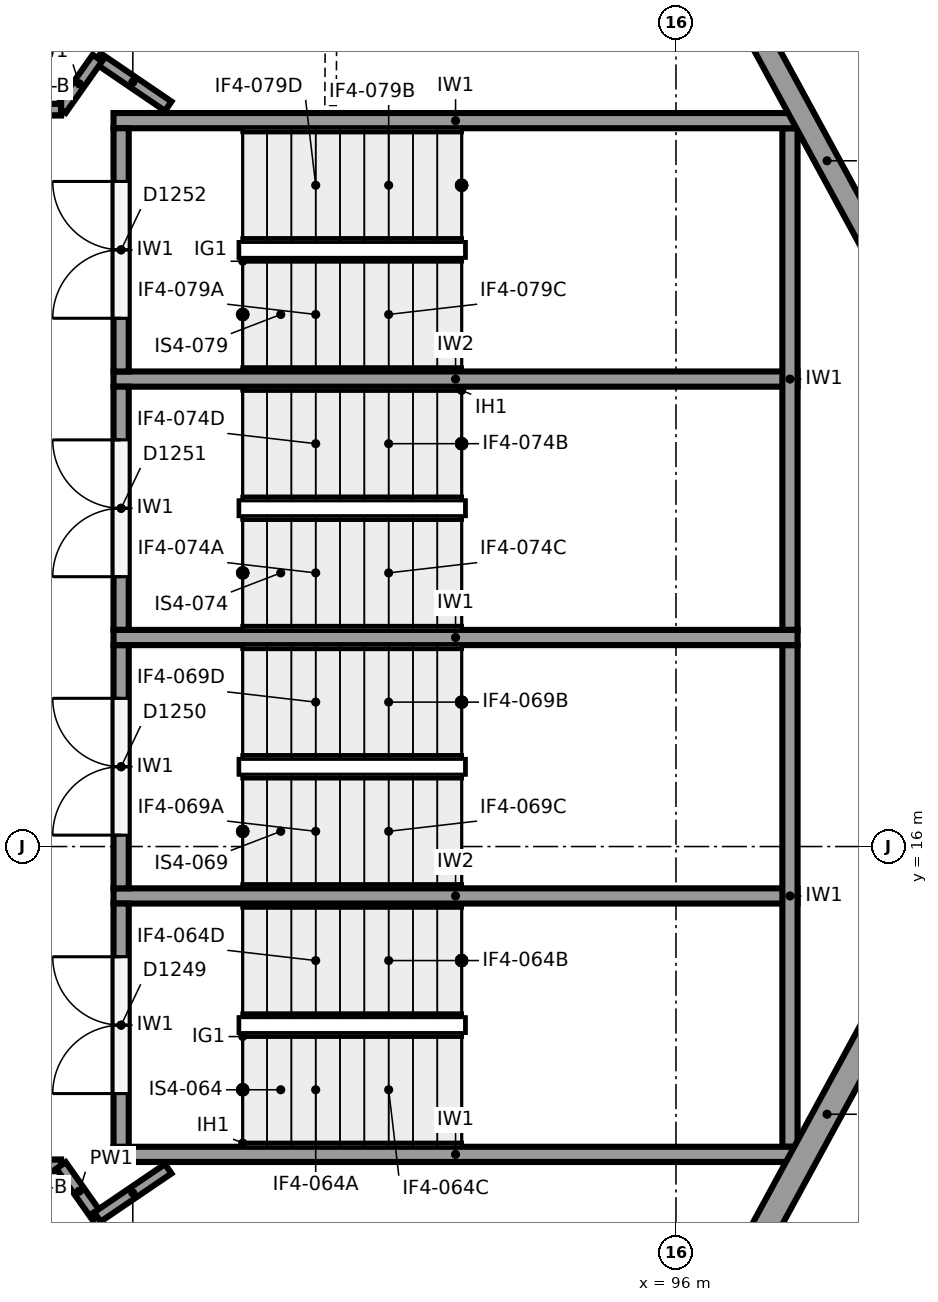
"""IFC4 building model, lengths in metres.
Left out: names, types, materials, properties, quantities, classifications, styles, units other than length and angle.
Written with IfcOpenShell. Run it as: python <this file> out.ifc"""

import sys

from ifc_helpers import new_model, si_unit, direction, frame, frame_2d, origin, place, context, subcontext, project, spatial, rectangle, extrude, element, fill, save


model = new_model("IFC4")
c1 = context("Model", 3, precision=1e-05, world=origin(), true_north=direction((0.0, 1.0)))
c2 = subcontext(c1, "Body", "Model", "MODEL_VIEW")
j1 = project(units=[si_unit("LENGTHUNIT", "METRE"), si_unit("PLANEANGLEUNIT", "RADIAN")], contexts=[c1])
p1 = place(None, origin())
s1 = spatial("IfcSite", under=j1, at=p1, CompositionType="ELEMENT")
p2 = place(p1, origin())
s2 = spatial("IfcBuilding", under=s1, at=p2, CompositionType="ELEMENT")
p3 = place(p2, frame((0.0, 0.0, 12.0)))
s3 = spatial("IfcBuildingStorey", under=s2, at=p3, CompositionType="ELEMENT", Elevation=12.0)
p4 = place(p3, frame((101.161, 18.311, 0.0), z_axis=(0.0, 0.0, 1.0), x_axis=(-0.477867771117, -0.878431780691, 0.0)))
e1 = element("IfcWall", 1, at=p4, inside=s3, PredefinedType="SOLIDWALL", context=c2, shape_type="SweptSolid", body=[
    extrude(rectangle(XDim=13.28, YDim=0.35, at=frame_2d((6.64, 0.0))), origin(), (0.0, 0.0, 1.0), 4.35),
])
p5 = place(p4, frame((11.63, 0.0, 1.0)))
e2 = element("IfcOpeningElement", 2, at=p5, cuts=e1, PredefinedType="OPENING", context=c2, shape_type="SweptSolid", body=[
    extrude(rectangle(XDim=0.9, YDim=3.25, at=frame_2d((0.45, 1.625))), frame((0.0, 0.185, 0.0), z_axis=(0.0, -1.0, 0.0), x_axis=(1.0, 0.0, 0.0)), (0.0, 0.0, 1.0), 0.37),
])
p6 = place(p4, frame((9.53, 0.0, 1.0)))
e3 = element("IfcOpeningElement", 3, at=p6, cuts=e1, PredefinedType="OPENING", context=c2, shape_type="SweptSolid", body=[
    extrude(rectangle(XDim=0.9, YDim=3.25, at=frame_2d((0.45, 1.625))), frame((0.0, 0.185, 0.0), z_axis=(0.0, -1.0, 0.0), x_axis=(1.0, 0.0, 0.0)), (0.0, 0.0, 1.0), 0.37),
])
p7 = place(p4, frame((1.13, 0.0, 1.0)))
e4 = element("IfcOpeningElement", 4, at=p7, cuts=e1, PredefinedType="OPENING", context=c2, shape_type="SweptSolid", body=[
    extrude(rectangle(XDim=0.9, YDim=3.25, at=frame_2d((0.45, 1.625))), frame((0.0, 0.185, 0.0), z_axis=(0.0, -1.0, 0.0), x_axis=(1.0, 0.0, 0.0)), (0.0, 0.0, 1.0), 0.37),
])
p8 = place(p3, frame((94.815, 30.855, 0.0), z_axis=(0.0, 0.0, 1.0), x_axis=(0.477867771117, -0.878431780691, 0.0)))
e5 = element("IfcWall", 5, at=p8, inside=s3, PredefinedType="SOLIDWALL", context=c2, shape_type="SweptSolid", body=[
    extrude(rectangle(XDim=13.28, YDim=0.3, at=frame_2d((6.64, 0.0))), origin(), (0.0, 0.0, 1.0), 4.35),
])
for number, where, z_axis, x_axis in (
    (6, (97.6, 11.95, 0.0), (0.0, 0.0, 1.0), (-1.0, 0.0, 0.0)),
    (7, (97.6, 18.75, 0.0), (0.0, 0.0, 1.0), (-1.0, 0.0, 0.0)),
    (8, (97.6, 25.55, 0.0), (0.0, 0.0, 1.0), (-1.0, 0.0, 0.0)),
):
    element("IfcWall", number, at=place(p3, frame(where, z_axis=z_axis, x_axis=x_axis)), inside=s3, PredefinedType="SHEAR", context=c2, shape_type="SweptSolid", body=[
        extrude(rectangle(XDim=9.0, YDim=0.2, at=frame_2d((4.5, 0.0))), origin(), (0.0, 0.0, 1.0), 5.65),
    ])
for number, where, z_axis, x_axis in (
    (9, (97.5, 12.05, 0.0), (0.0, 0.0, 1.0), (0.0, 1.0, 0.0)),
    (10, (97.5, 18.85, 0.0), (0.0, 0.0, 1.0), (0.0, 1.0, 0.0)),
):
    element("IfcWall", number, at=place(p3, frame(where, z_axis=z_axis, x_axis=x_axis)), inside=s3, PredefinedType="SHEAR", context=c2, shape_type="SweptSolid", body=[
        extrude(rectangle(XDim=6.6, YDim=0.2, at=frame_2d((3.3, 0.0))), origin(), (0.0, 0.0, 1.0), 5.65),
    ])
for number, where, z_axis, x_axis in (
    (11, (97.6, 15.35, 0.0), (0.0, 0.0, 1.0), (-1.0, 0.0, 0.0)),
    (12, (97.6, 22.15, 0.0), (0.0, 0.0, 1.0), (-1.0, 0.0, 0.0)),
):
    element("IfcWall", number, at=place(p3, frame(where, z_axis=z_axis, x_axis=x_axis)), inside=s3, PredefinedType="SHEAR", context=c2, shape_type="SweptSolid", body=[
        extrude(rectangle(XDim=9.0, YDim=0.2, at=frame_2d((4.5, 0.0))), origin(), (0.0, 0.0, 1.0), 5.65),
    ])
p9 = place(p3, frame((88.7, 12.05, 0.0), z_axis=(0.0, 0.0, 1.0), x_axis=(0.0, 1.0, 0.0)))
e13 = element("IfcWall", 13, at=p9, inside=s3, PredefinedType="SHEAR", context=c2, shape_type="SweptSolid", body=[
    extrude(rectangle(XDim=3.2, YDim=0.2, at=frame_2d((1.6, 0.0))), origin(), (0.0, 0.0, 1.0), 5.65),
])
p10 = place(p9, frame((0.7, 0.0, 0.0)))
e14 = element("IfcOpeningElement", 14, at=p10, cuts=e13, PredefinedType="OPENING", context=c2, shape_type="SweptSolid", body=[
    extrude(rectangle(XDim=1.8, YDim=2.1, at=frame_2d((0.9, 1.05))), frame((0.0, 0.11, 0.0), z_axis=(0.0, -1.0, 0.0), x_axis=(1.0, 0.0, 0.0)), (0.0, 0.0, 1.0), 0.22),
])
p11 = place(p3, frame((88.7, 15.45, 0.0), z_axis=(0.0, 0.0, 1.0), x_axis=(0.0, 1.0, 0.0)))
e15 = element("IfcWall", 15, at=p11, inside=s3, PredefinedType="SHEAR", context=c2, shape_type="SweptSolid", body=[
    extrude(rectangle(XDim=3.2, YDim=0.2, at=frame_2d((1.6, 0.0))), origin(), (0.0, 0.0, 1.0), 5.65),
])
p12 = place(p11, frame((0.7, 0.0, 0.0)))
e16 = element("IfcOpeningElement", 16, at=p12, cuts=e15, PredefinedType="OPENING", context=c2, shape_type="SweptSolid", body=[
    extrude(rectangle(XDim=1.8, YDim=2.1, at=frame_2d((0.9, 1.05))), frame((0.0, 0.11, 0.0), z_axis=(0.0, -1.0, 0.0), x_axis=(1.0, 0.0, 0.0)), (0.0, 0.0, 1.0), 0.22),
])
p13 = place(p3, frame((88.7, 18.85, 0.0), z_axis=(0.0, 0.0, 1.0), x_axis=(0.0, 1.0, 0.0)))
e17 = element("IfcWall", 17, at=p13, inside=s3, PredefinedType="SHEAR", context=c2, shape_type="SweptSolid", body=[
    extrude(rectangle(XDim=3.2, YDim=0.2, at=frame_2d((1.6, 0.0))), origin(), (0.0, 0.0, 1.0), 5.65),
])
p14 = place(p13, frame((0.7, 0.0, 0.0)))
e18 = element("IfcOpeningElement", 18, at=p14, cuts=e17, PredefinedType="OPENING", context=c2, shape_type="SweptSolid", body=[
    extrude(rectangle(XDim=1.8, YDim=2.1, at=frame_2d((0.9, 1.05))), frame((0.0, 0.11, 0.0), z_axis=(0.0, -1.0, 0.0), x_axis=(1.0, 0.0, 0.0)), (0.0, 0.0, 1.0), 0.22),
])
p15 = place(p3, frame((88.7, 22.25, 0.0), z_axis=(0.0, 0.0, 1.0), x_axis=(0.0, 1.0, 0.0)))
e19 = element("IfcWall", 19, at=p15, inside=s3, PredefinedType="SHEAR", context=c2, shape_type="SweptSolid", body=[
    extrude(rectangle(XDim=3.2, YDim=0.2, at=frame_2d((1.6, 0.0))), origin(), (0.0, 0.0, 1.0), 5.65),
])
p16 = place(p15, frame((0.7, 0.0, 0.0)))
e20 = element("IfcOpeningElement", 20, at=p16, cuts=e19, PredefinedType="OPENING", context=c2, shape_type="SweptSolid", body=[
    extrude(rectangle(XDim=1.8, YDim=2.1, at=frame_2d((0.9, 1.05))), frame((0.0, 0.11, 0.0), z_axis=(0.0, -1.0, 0.0), x_axis=(1.0, 0.0, 0.0)), (0.0, 0.0, 1.0), 0.22),
])
p17 = place(p3, frame((91.455, 25.75, 0.0), z_axis=(0.0, 0.0, 1.0), x_axis=(0.006125459352, 0.999981239198, 0.0)))
e21 = element("IfcWall", 21, at=p17, inside=s3, PredefinedType="PARTITIONING", context=c2, shape_type="SweptSolid", body=[
    extrude(rectangle(XDim=4.783, YDim=0.15, at=frame_2d((2.391, 0.0))), origin(), (0.0, 0.0, 1.0), 5.65),
])
p18 = place(p17, frame((1.95, 0.0, 0.0)))
e22 = element("IfcOpeningElement", 22, at=p18, cuts=e21, PredefinedType="OPENING", context=c2, shape_type="SweptSolid", body=[
    extrude(rectangle(XDim=1.0, YDim=2.1, at=frame_2d((0.5, 1.05))), frame((0.0, 0.085, 0.0), z_axis=(0.0, -1.0, 0.0), x_axis=(1.0, 0.0, 0.0)), (0.0, 0.0, 1.0), 0.17),
])
p19 = place(p3, frame((89.32, 25.74, 0.0), z_axis=(0.0, 0.0, 1.0), x_axis=(-0.826749248939, 0.562570599462, 0.0)))
e23 = element("IfcWall", 23, at=p19, inside=s3, PredefinedType="PARTITIONING", context=c2, shape_type="SweptSolid", body=[
    extrude(rectangle(XDim=1.127, YDim=0.15, at=frame_2d((0.564, 0.0))), origin(), (0.0, 0.0, 1.0), 5.65),
])
p20 = place(p3, frame((88.388, 26.374, 0.0), z_axis=(0.0, 0.0, 1.0), x_axis=(-0.5761634622, -0.817334487726, 0.0)))
e24 = element("IfcWall", 24, at=p20, inside=s3, PredefinedType="PARTITIONING", context=c2, shape_type="SweptSolid", body=[
    extrude(rectangle(XDim=0.83, YDim=0.15, at=frame_2d((0.415, 0.0))), origin(), (0.0, 0.0, 1.0), 5.65),
])
p21 = place(p3, frame((87.909, 25.695, 0.0), z_axis=(0.0, 0.0, 1.0), x_axis=(-0.999999997827, -6.5919578e-05, 0.0)))
e25 = element("IfcWall", 25, at=p21, inside=s3, PredefinedType="PARTITIONING", context=c2, shape_type="SweptSolid", body=[
    extrude(rectangle(XDim=3.704, YDim=0.15, at=frame_2d((1.852, 0.0))), origin(), (0.0, 0.0, 1.0), 4.55),
])
p22 = place(p21, frame((0.65, 0.0, 0.0)))
e26 = element("IfcOpeningElement", 26, at=p22, cuts=e25, PredefinedType="OPENING", context=c2, shape_type="SweptSolid", body=[
    extrude(rectangle(XDim=1.8, YDim=2.1, at=frame_2d((0.9, 1.05))), frame((0.0, 0.085, 0.0), z_axis=(0.0, -1.0, 0.0), x_axis=(1.0, 0.0, 0.0)), (0.0, 0.0, 1.0), 0.17),
])
p23 = place(p3, frame((87.909, 25.695, 4.55), z_axis=(0.0, 0.0, 1.0), x_axis=(-1.0, 0.0, 0.0)))
e27 = element("IfcWall", 27, at=p23, inside=s3, PredefinedType="PARTITIONING", context=c2, shape_type="SweptSolid", body=[
    extrude(rectangle(XDim=0.6, YDim=0.15, at=frame_2d((0.3, 0.0))), origin(), (0.0, 0.0, 1.0), 1.1),
])
p24 = place(p3, frame((81.555, 11.805, 0.0), z_axis=(0.0, 0.0, 1.0), x_axis=(1.0, 0.0, 0.0)))
e28 = element("IfcWall", 28, at=p24, inside=s3, PredefinedType="PARTITIONING", context=c2, shape_type="SweptSolid", body=[
    extrude(rectangle(XDim=6.354, YDim=0.15, at=frame_2d((3.177, 0.0))), origin(), (0.0, 0.0, 1.0), 4.55),
])
p25 = place(p24, frame((3.85, 0.0, 0.0)))
e29 = element("IfcOpeningElement", 29, at=p25, cuts=e28, PredefinedType="OPENING", context=c2, shape_type="SweptSolid", body=[
    extrude(rectangle(XDim=1.8, YDim=2.1, at=frame_2d((0.9, 1.05))), frame((0.0, 0.085, 0.0), z_axis=(0.0, -1.0, 0.0), x_axis=(1.0, 0.0, 0.0)), (0.0, 0.0, 1.0), 0.17),
])
p26 = place(p3, frame((87.255, 11.805, 4.55), z_axis=(0.0, 0.0, 1.0), x_axis=(1.0, 0.0, 0.0)))
e30 = element("IfcWall", 30, at=p26, inside=s3, PredefinedType="PARTITIONING", context=c2, shape_type="SweptSolid", body=[
    extrude(rectangle(XDim=0.654, YDim=0.15, at=frame_2d((0.327, 0.0))), origin(), (0.0, 0.0, 1.0), 1.1),
])
p27 = place(p3, frame((87.909, 11.805, 0.0), z_axis=(0.0, 0.0, 1.0), x_axis=(0.575573582652, -0.81774999294, 0.0)))
e31 = element("IfcWall", 31, at=p27, inside=s3, PredefinedType="PARTITIONING", context=c2, shape_type="SweptSolid", body=[
    extrude(rectangle(XDim=0.83, YDim=0.15, at=frame_2d((0.415, 0.0))), origin(), (0.0, 0.0, 1.0), 5.65),
])
p28 = place(p3, frame((88.387, 11.126, 0.0), z_axis=(0.0, 0.0, 1.0), x_axis=(0.827055308354, 0.562120553728, 0.0)))
e32 = element("IfcWall", 32, at=p28, inside=s3, PredefinedType="PARTITIONING", context=c2, shape_type="SweptSolid", body=[
    extrude(rectangle(XDim=1.128, YDim=0.15, at=frame_2d((0.564, 0.0))), origin(), (0.0, 0.0, 1.0), 5.65),
])
p29 = place(p10, origin())
e33 = element("IfcDoor", 33, at=p29, inside=s3, OperationType="DOUBLE_DOOR_SINGLE_SWING", PredefinedType="DOOR", context=c2, shape_type="SweptSolid", body=[
    extrude(rectangle(XDim=1.8, YDim=2.1, at=frame_2d((0.9, 1.05))), frame((0.0, 0.025, 0.0), z_axis=(0.0, -1.0, 0.0), x_axis=(1.0, 0.0, 0.0)), (0.0, 0.0, 1.0), 0.05),
])
fill(e14, e33)
p30 = place(p12, origin())
e34 = element("IfcDoor", 34, at=p30, inside=s3, OperationType="DOUBLE_DOOR_SINGLE_SWING", PredefinedType="DOOR", context=c2, shape_type="SweptSolid", body=[
    extrude(rectangle(XDim=1.8, YDim=2.1, at=frame_2d((0.9, 1.05))), frame((0.0, 0.025, 0.0), z_axis=(0.0, -1.0, 0.0), x_axis=(1.0, 0.0, 0.0)), (0.0, 0.0, 1.0), 0.05),
])
fill(e16, e34)
p31 = place(p14, origin())
e35 = element("IfcDoor", 35, at=p31, inside=s3, OperationType="DOUBLE_DOOR_SINGLE_SWING", PredefinedType="DOOR", context=c2, shape_type="SweptSolid", body=[
    extrude(rectangle(XDim=1.8, YDim=2.1, at=frame_2d((0.9, 1.05))), frame((0.0, 0.025, 0.0), z_axis=(0.0, -1.0, 0.0), x_axis=(1.0, 0.0, 0.0)), (0.0, 0.0, 1.0), 0.05),
])
fill(e18, e35)
p32 = place(p16, origin())
e36 = element("IfcDoor", 36, at=p32, inside=s3, OperationType="DOUBLE_DOOR_SINGLE_SWING", PredefinedType="DOOR", context=c2, shape_type="SweptSolid", body=[
    extrude(rectangle(XDim=1.8, YDim=2.1, at=frame_2d((0.9, 1.05))), frame((0.0, 0.025, 0.0), z_axis=(0.0, -1.0, 0.0), x_axis=(1.0, 0.0, 0.0)), (0.0, 0.0, 1.0), 0.05),
])
fill(e20, e36)
save(model, sys.argv[1])
